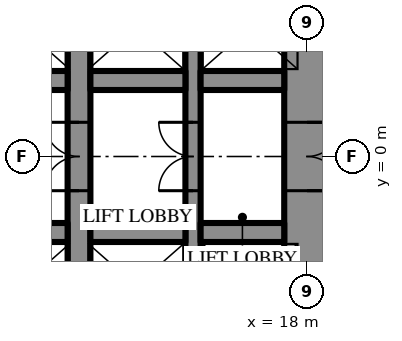
"""IFC4 building model, lengths in metres.
Left out: names, types, materials, properties, quantities, classifications, styles, units other than length and angle.
Written with IfcOpenShell. Run it as: python <this file> out.ifc"""

import sys

from ifc_helpers import new_model, si_unit, direction, frame, frame_2d, origin, place, context, subcontext, project, spatial, rectangle, extrude, element, fill, save


model = new_model("IFC4")
c1 = context("Model", 3, precision=1e-05, world=origin(), true_north=direction((0.0, 1.0)))
c2 = subcontext(c1, "Body", "Model", "MODEL_VIEW")
j1 = project(units=[si_unit("LENGTHUNIT", "METRE"), si_unit("PLANEANGLEUNIT", "RADIAN")], contexts=[c1])
p1 = place(None, origin())
s1 = spatial("IfcSite", under=j1, at=p1, CompositionType="ELEMENT")
p2 = place(p1, origin())
s2 = spatial("IfcBuilding", under=s1, at=p2, CompositionType="ELEMENT")
p3 = place(p2, frame((0.0, 0.0, 86.5)))
s3 = spatial("IfcBuildingStorey", under=s2, at=p3, CompositionType="ELEMENT", Elevation=86.5)
p4 = place(p3, frame((18.0, -10.7, 0.0), z_axis=(0.0, 0.0, 1.0), x_axis=(0.0, 1.0, 0.0)))
e1 = element("IfcWall", 1, at=p4, inside=s3, PredefinedType="SHEAR", context=c2, shape_type="SweptSolid", body=[
    extrude(rectangle(XDim=21.4, YDim=1.2, at=frame_2d((10.7, 0.0))), origin(), (0.0, 0.0, 1.0), 4.2),
])
p5 = place(p4, frame((9.8, 0.0, 0.0)))
e2 = element("IfcOpeningElement", 2, at=p5, cuts=e1, PredefinedType="OPENING", context=c2, shape_type="SweptSolid", body=[
    extrude(rectangle(XDim=1.8, YDim=2.4, at=frame_2d((0.9, 1.2))), frame((0.0, 0.61, 0.0), z_axis=(0.0, -1.0, 0.0), x_axis=(1.0, 0.0, 0.0)), (0.0, 0.0, 1.0), 1.22),
])
p6 = place(p3, frame((12.0, -10.7, 0.0), z_axis=(0.0, 0.0, 1.0), x_axis=(0.0, 1.0, 0.0)))
e3 = element("IfcWall", 3, at=p6, inside=s3, PredefinedType="SHEAR", context=c2, shape_type="SweptSolid", body=[
    extrude(rectangle(XDim=21.4, YDim=0.6, at=frame_2d((10.7, 0.0))), origin(), (0.0, 0.0, 1.0), 4.2),
])
p7 = place(p6, frame((9.8, 0.0, 0.0)))
e4 = element("IfcOpeningElement", 4, at=p7, cuts=e3, PredefinedType="OPENING", context=c2, shape_type="SweptSolid", body=[
    extrude(rectangle(XDim=1.8, YDim=2.4, at=frame_2d((0.9, 1.2))), frame((0.0, 0.31, 0.0), z_axis=(0.0, -1.0, 0.0), x_axis=(1.0, 0.0, 0.0)), (0.0, 0.0, 1.0), 0.62),
])
p8 = place(p3, frame((15.0, -10.7, 0.0), z_axis=(0.0, 0.0, 1.0), x_axis=(0.0, 1.0, 0.0)))
e5 = element("IfcWall", 5, at=p8, inside=s3, PredefinedType="SHEAR", context=c2, shape_type="SweptSolid", body=[
    extrude(rectangle(XDim=21.4, YDim=0.4, at=frame_2d((10.7, 0.0))), origin(), (0.0, 0.0, 1.0), 4.2),
])
p9 = place(p8, frame((9.8, 0.0, 0.0)))
e6 = element("IfcOpeningElement", 6, at=p9, cuts=e5, PredefinedType="OPENING", context=c2, shape_type="SweptSolid", body=[
    extrude(rectangle(XDim=1.8, YDim=2.4, at=frame_2d((0.9, 1.2))), frame((0.0, 0.21, 0.0), z_axis=(0.0, -1.0, 0.0), x_axis=(1.0, 0.0, 0.0)), (0.0, 0.0, 1.0), 0.42),
])
p10 = place(p3, frame((-3.2, 2.0, 0.0), z_axis=(0.0, 0.0, 1.0), x_axis=(1.0, 0.0, 0.0)))
e7 = element("IfcWall", 7, at=p10, inside=s3, PredefinedType="SHEAR", context=c2, shape_type="SweptSolid", body=[
    extrude(rectangle(XDim=14.9, YDim=0.5, at=frame_2d((7.45, 0.0))), origin(), (0.0, 0.0, 1.0), 4.2),
])
p11 = place(p10, frame((1.15, 0.0, 0.0)))
e8 = element("IfcOpeningElement", 8, at=p11, cuts=e7, PredefinedType="OPENING", context=c2, shape_type="SweptSolid", body=[
    extrude(rectangle(XDim=1.1, YDim=2.2, at=frame_2d((0.55, 1.1))), frame((0.0, 0.26, 0.0), z_axis=(0.0, -1.0, 0.0), x_axis=(1.0, 0.0, 0.0)), (0.0, 0.0, 1.0), 0.52),
])
p12 = place(p10, frame((4.15, 0.0, 0.0)))
e9 = element("IfcOpeningElement", 9, at=p12, cuts=e7, PredefinedType="OPENING", context=c2, shape_type="SweptSolid", body=[
    extrude(rectangle(XDim=1.1, YDim=2.2, at=frame_2d((0.55, 1.1))), frame((0.0, 0.26, 0.0), z_axis=(0.0, -1.0, 0.0), x_axis=(1.0, 0.0, 0.0)), (0.0, 0.0, 1.0), 0.52),
])
p13 = place(p10, frame((7.15, 0.0, 0.0)))
e10 = element("IfcOpeningElement", 10, at=p13, cuts=e7, PredefinedType="OPENING", context=c2, shape_type="SweptSolid", body=[
    extrude(rectangle(XDim=1.1, YDim=2.2, at=frame_2d((0.55, 1.1))), frame((0.0, 0.26, 0.0), z_axis=(0.0, -1.0, 0.0), x_axis=(1.0, 0.0, 0.0)), (0.0, 0.0, 1.0), 0.52),
])
p14 = place(p10, frame((10.15, 0.0, 0.0)))
e11 = element("IfcOpeningElement", 11, at=p14, cuts=e7, PredefinedType="OPENING", context=c2, shape_type="SweptSolid", body=[
    extrude(rectangle(XDim=1.1, YDim=2.2, at=frame_2d((0.55, 1.1))), frame((0.0, 0.26, 0.0), z_axis=(0.0, -1.0, 0.0), x_axis=(1.0, 0.0, 0.0)), (0.0, 0.0, 1.0), 0.52),
])
p15 = place(p3, frame((12.3, 2.0, 0.0), z_axis=(0.0, 0.0, 1.0), x_axis=(1.0, 0.0, 0.0)))
e12 = element("IfcWall", 12, at=p15, inside=s3, PredefinedType="SHEAR", context=c2, shape_type="SweptSolid", body=[
    extrude(rectangle(XDim=2.5, YDim=0.5, at=frame_2d((1.25, 0.0))), origin(), (0.0, 0.0, 1.0), 4.2),
])
for number, where, z_axis, x_axis in (
    (13, (15.2, 2.0, 0.0), (0.0, 0.0, 1.0), (1.0, 0.0, 0.0)),
    (14, (17.4, -2.0, 0.0), (0.0, 0.0, 1.0), (-1.0, 0.0, 0.0)),
):
    element("IfcWall", number, at=place(p3, frame(where, z_axis=z_axis, x_axis=x_axis)), inside=s3, PredefinedType="SHEAR", context=c2, shape_type="SweptSolid", body=[
        extrude(rectangle(XDim=2.2, YDim=0.5, at=frame_2d((1.1, 0.0))), origin(), (0.0, 0.0, 1.0), 4.2),
    ])
p16 = place(p3, frame((14.8, -2.0, 0.0), z_axis=(0.0, 0.0, 1.0), x_axis=(-1.0, 0.0, 0.0)))
e15 = element("IfcWall", 15, at=p16, inside=s3, PredefinedType="SHEAR", context=c2, shape_type="SweptSolid", body=[
    extrude(rectangle(XDim=2.5, YDim=0.5, at=frame_2d((1.25, 0.0))), origin(), (0.0, 0.0, 1.0), 4.2),
])
p17 = place(p3, frame((11.7, -2.0, 0.0), z_axis=(0.0, 0.0, 1.0), x_axis=(-1.0, 0.0, 0.0)))
e16 = element("IfcWall", 16, at=p17, inside=s3, PredefinedType="SHEAR", context=c2, shape_type="SweptSolid", body=[
    extrude(rectangle(XDim=5.9, YDim=0.5, at=frame_2d((2.95, 0.0))), origin(), (0.0, 0.0, 1.0), 4.2),
])
p18 = place(p5, frame((1.8, 0.0, 0.0), z_axis=(0.0, 0.0, 1.0), x_axis=(-1.0, 0.0, 0.0)))
e17 = element("IfcDoor", 17, at=p18, inside=s3, OperationType="DOUBLE_DOOR_SINGLE_SWING", PredefinedType="DOOR", context=c2, shape_type="SweptSolid", body=[
    extrude(rectangle(XDim=1.8, YDim=2.4, at=frame_2d((0.9, 1.2))), frame((0.0, 0.025, 0.0), z_axis=(0.0, -1.0, 0.0), x_axis=(1.0, 0.0, 0.0)), (0.0, 0.0, 1.0), 0.05),
])
fill(e2, e17)
p19 = place(p7, origin())
e18 = element("IfcDoor", 18, at=p19, inside=s3, OperationType="DOUBLE_DOOR_SINGLE_SWING", PredefinedType="DOOR", context=c2, shape_type="SweptSolid", body=[
    extrude(rectangle(XDim=1.8, YDim=2.4, at=frame_2d((0.9, 1.2))), frame((0.0, 0.025, 0.0), z_axis=(0.0, -1.0, 0.0), x_axis=(1.0, 0.0, 0.0)), (0.0, 0.0, 1.0), 0.05),
])
fill(e4, e18)
p20 = place(p9, origin())
e19 = element("IfcDoor", 19, at=p20, inside=s3, OperationType="DOUBLE_DOOR_SINGLE_SWING", PredefinedType="DOOR", context=c2, shape_type="SweptSolid", body=[
    extrude(rectangle(XDim=1.8, YDim=2.4, at=frame_2d((0.9, 1.2))), frame((0.0, 0.025, 0.0), z_axis=(0.0, -1.0, 0.0), x_axis=(1.0, 0.0, 0.0)), (0.0, 0.0, 1.0), 0.05),
])
fill(e6, e19)
save(model, sys.argv[1])
